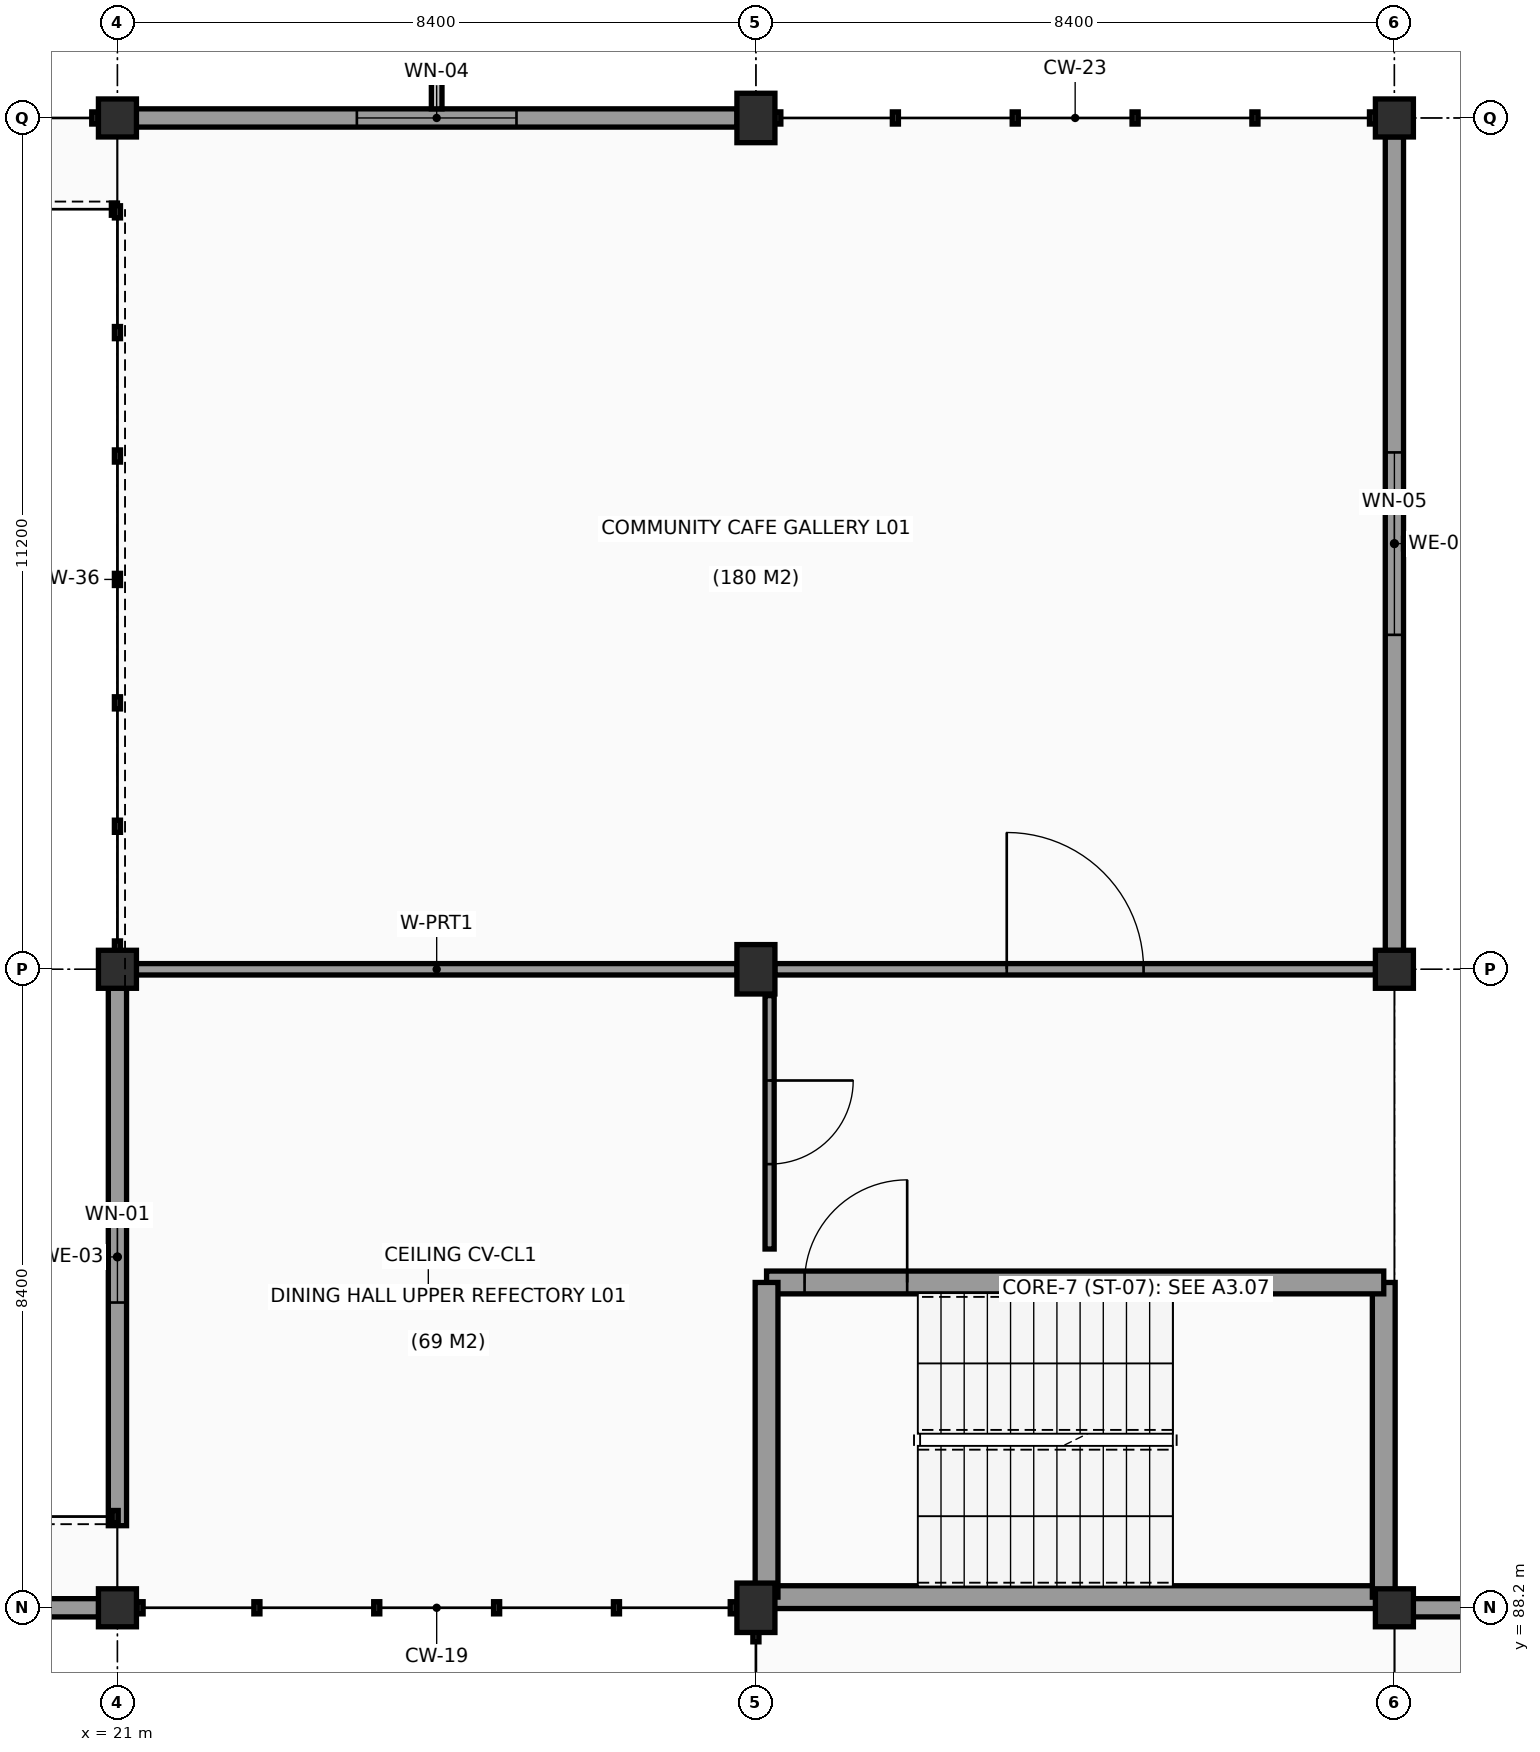
"""IFC4 building model, lengths in metres.
Left out: names, types, materials, properties, quantities, classifications, styles, units other than length and angle.
Written with IfcOpenShell. Run it as: python <this file> out.ifc"""

import sys

from ifc_helpers import new_model, si_unit, direction, frame, frame_2d, origin, origin_2d, place, context, subcontext, project, spatial, rectangle, extrude, element, fill, save


model = new_model("IFC4")
c1 = context("Model", 3, precision=1e-05, world=origin(), true_north=direction((0.0, 1.0)))
c2 = subcontext(c1, "Body", "Model", "MODEL_VIEW")
j1 = project(units=[si_unit("LENGTHUNIT", "METRE"), si_unit("PLANEANGLEUNIT", "RADIAN")], contexts=[c1])
p1 = place(None, origin())
s1 = spatial("IfcSite", under=j1, at=p1, CompositionType="ELEMENT")
p2 = place(p1, origin())
s2 = spatial("IfcBuilding", under=s1, at=p2, CompositionType="ELEMENT")
p3 = place(p2, frame((0.0, 0.0, 4.2)))
s3 = spatial("IfcBuildingStorey", under=s2, at=p3, CompositionType="ELEMENT", Elevation=4.2)
for number, where, z_axis, x_axis in (
    (1, (21.0, 88.2, 0.0), (0.0, 0.0, 1.0), (1.0, 0.0, 0.0)),
    (2, (21.0, 96.6, 0.0), (0.0, 0.0, 1.0), (1.0, 0.0, 0.0)),
    (3, (21.0, 107.8, 0.0), (0.0, 0.0, 1.0), (1.0, 0.0, 0.0)),
):
    element("IfcColumn", number, at=place(p3, frame(where, z_axis=z_axis, x_axis=x_axis)), inside=s3, PredefinedType="COLUMN", context=c2, shape_type="SweptSolid", body=[
        extrude(rectangle(XDim=0.5, YDim=0.5, at=origin_2d()), origin(), (0.0, 0.0, 1.0), 3.6),
    ])
for number, where, z_axis, x_axis in (
    (4, (29.4, 88.2, 0.0), (0.0, 0.0, 1.0), (1.0, 0.0, 0.0)),
    (5, (29.4, 96.6, 0.0), (0.0, 0.0, 1.0), (1.0, 0.0, 0.0)),
    (6, (29.4, 107.8, 0.0), (0.0, 0.0, 1.0), (1.0, 0.0, 0.0)),
):
    element("IfcColumn", number, at=place(p3, frame(where, z_axis=z_axis, x_axis=x_axis)), inside=s3, PredefinedType="COLUMN", context=c2, shape_type="SweptSolid", body=[
        extrude(rectangle(XDim=0.5, YDim=0.65, at=origin_2d()), origin(), (0.0, 0.0, 1.0), 3.6),
    ])
for number, where, z_axis, x_axis in (
    (7, (37.8, 88.2, 0.0), (0.0, 0.0, 1.0), (1.0, 0.0, 0.0)),
    (8, (37.8, 96.6, 0.0), (0.0, 0.0, 1.0), (1.0, 0.0, 0.0)),
    (9, (37.8, 107.8, 0.0), (0.0, 0.0, 1.0), (1.0, 0.0, 0.0)),
):
    element("IfcColumn", number, at=place(p3, frame(where, z_axis=z_axis, x_axis=x_axis)), inside=s3, PredefinedType="COLUMN", context=c2, shape_type="SweptSolid", body=[
        extrude(rectangle(XDim=0.5, YDim=0.5, at=origin_2d()), origin(), (0.0, 0.0, 1.0), 3.6),
    ])
p4 = place(p3, frame((20.752, 88.2, 0.0), z_axis=(0.0, 0.0, 1.0), x_axis=(-1.0, 0.0, 0.0)))
e10 = element("IfcWall", 10, at=p4, inside=s3, PredefinedType="SOLIDWALL", context=c2, shape_type="SweptSolid", body=[
    extrude(rectangle(XDim=7.904, YDim=0.24, at=frame_2d((3.952, 0.0))), origin(), (0.0, 0.0, 1.0), 2.62),
])
p5 = place(p3, frame((21.248, 107.8, 0.0), z_axis=(0.0, 0.0, 1.0), x_axis=(1.0, 0.0, 0.0)))
e11 = element("IfcWall", 11, at=p5, inside=s3, PredefinedType="SOLIDWALL", context=c2, shape_type="SweptSolid", body=[
    extrude(rectangle(XDim=7.904, YDim=0.24, at=frame_2d((3.952, 0.0))), origin(), (0.0, 0.0, 1.0), 2.67),
])
p6 = place(p5, frame((2.902, 0.0, 0.95)))
e12 = element("IfcOpeningElement", 12, at=p6, cuts=e11, PredefinedType="OPENING", context=c2, shape_type="SweptSolid", body=[
    extrude(rectangle(XDim=2.1, YDim=1.2, at=frame_2d((1.05, 0.6))), frame((0.0, 0.13, 0.0), z_axis=(0.0, -1.0, 0.0), x_axis=(1.0, 0.0, 0.0)), (0.0, 0.0, 1.0), 0.26),
])
p7 = place(p3, frame((37.8, 107.552, 0.0), z_axis=(0.0, 0.0, 1.0), x_axis=(0.0, -1.0, 0.0)))
e13 = element("IfcWall", 13, at=p7, inside=s3, PredefinedType="SOLIDWALL", context=c2, shape_type="SweptSolid", body=[
    extrude(rectangle(XDim=10.704, YDim=0.24, at=frame_2d((5.352, 0.0))), origin(), (0.0, 0.0, 1.0), 2.96),
])
p8 = place(p7, frame((4.152, 0.0, 0.95)))
e14 = element("IfcOpeningElement", 14, at=p8, cuts=e13, PredefinedType="OPENING", context=c2, shape_type="SweptSolid", body=[
    extrude(rectangle(XDim=2.4, YDim=1.2, at=frame_2d((1.2, 0.6))), frame((0.0, 0.13, 0.0), z_axis=(0.0, -1.0, 0.0), x_axis=(1.0, 0.0, 0.0)), (0.0, 0.0, 1.0), 0.26),
])
p9 = place(p3, frame((38.048, 88.2, 0.0), z_axis=(0.0, 0.0, 1.0), x_axis=(1.0, 0.0, 0.0)))
e15 = element("IfcWall", 15, at=p9, inside=s3, PredefinedType="SOLIDWALL", context=c2, shape_type="SweptSolid", body=[
    extrude(rectangle(XDim=2.504, YDim=0.24, at=frame_2d((1.252, 0.0))), origin(), (0.0, 0.0, 1.0), 2.58),
])
p10 = place(p3, frame((21.0, 89.28, 0.0), z_axis=(0.0, 0.0, 1.0), x_axis=(0.0, 1.0, 0.0)))
e16 = element("IfcWall", 16, at=p10, inside=s3, PredefinedType="SOLIDWALL", context=c2, shape_type="SweptSolid", body=[
    extrude(rectangle(XDim=7.072, YDim=0.24, at=frame_2d((3.536, 0.0))), origin(), (0.0, 0.0, 1.0), 2.72),
])
p11 = place(p10, frame((2.936, 0.0, 0.95)))
e17 = element("IfcOpeningElement", 17, at=p11, cuts=e16, PredefinedType="OPENING", context=c2, shape_type="SweptSolid", body=[
    extrude(rectangle(XDim=1.2, YDim=1.2, at=frame_2d((0.6, 0.6))), frame((0.0, 0.13, 0.0), z_axis=(0.0, -1.0, 0.0), x_axis=(1.0, 0.0, 0.0)), (0.0, 0.0, 1.0), 0.26),
])
p12 = place(p3, frame((29.54, 88.34, 0.0), z_axis=(0.0, 0.0, 1.0), x_axis=(1.0, 0.0, 0.0)))
e18 = element("IfcWall", 18, at=p12, inside=s3, PredefinedType="SHEAR", context=c2, shape_type="SweptSolid", body=[
    extrude(rectangle(XDim=8.12, YDim=0.3, at=frame_2d((4.06, 0.0))), origin(), (0.0, 0.0, 1.0), 3.6),
])
p13 = place(p3, frame((37.66, 88.34, 0.0), z_axis=(0.0, 0.0, 1.0), x_axis=(0.0, 1.0, 0.0)))
e19 = element("IfcWall", 19, at=p13, inside=s3, PredefinedType="SHEAR", context=c2, shape_type="SweptSolid", body=[
    extrude(rectangle(XDim=4.14, YDim=0.3, at=frame_2d((2.07, 0.0))), origin(), (0.0, 0.0, 1.0), 3.6),
])
p14 = place(p3, frame((37.66, 92.48, 0.0), z_axis=(0.0, 0.0, 1.0), x_axis=(-1.0, 0.0, 0.0)))
e20 = element("IfcWall", 20, at=p14, inside=s3, PredefinedType="SHEAR", context=c2, shape_type="SweptSolid", body=[
    extrude(rectangle(XDim=8.12, YDim=0.3, at=frame_2d((4.06, 0.0))), origin(), (0.0, 0.0, 1.0), 3.6),
])
p15 = place(p14, frame((6.27, 0.0, 0.0)))
e21 = element("IfcOpeningElement", 21, at=p15, cuts=e20, PredefinedType="OPENING", context=c2, shape_type="SweptSolid", body=[
    extrude(rectangle(XDim=1.35, YDim=2.15, at=frame_2d((0.675, 1.075))), frame((0.0, 0.16, 0.0), z_axis=(0.0, -1.0, 0.0), x_axis=(1.0, 0.0, 0.0)), (0.0, 0.0, 1.0), 0.32),
])
p16 = place(p3, frame((29.54, 92.48, 0.0), z_axis=(0.0, 0.0, 1.0), x_axis=(0.0, -1.0, 0.0)))
e22 = element("IfcWall", 22, at=p16, inside=s3, PredefinedType="SHEAR", context=c2, shape_type="SweptSolid", body=[
    extrude(rectangle(XDim=4.14, YDim=0.3, at=frame_2d((2.07, 0.0))), origin(), (0.0, 0.0, 1.0), 3.6),
])
p17 = place(p3, frame((21.248, 96.6, 0.0), z_axis=(0.0, 0.0, 1.0), x_axis=(1.0, 0.0, 0.0)))
e23 = element("IfcWall", 23, at=p17, inside=s3, PredefinedType="PARTITIONING", context=c2, shape_type="SweptSolid", body=[
    extrude(rectangle(XDim=7.904, YDim=0.15, at=frame_2d((3.952, 0.0))), origin(), (0.0, 0.0, 1.0), 2.57),
])
p18 = place(p3, frame((29.58, 96.254, 0.0), z_axis=(0.0, 0.0, 1.0), x_axis=(0.0, -1.0, 0.0)))
e24 = element("IfcWall", 24, at=p18, inside=s3, PredefinedType="PARTITIONING", context=c2, shape_type="SweptSolid", body=[
    extrude(rectangle(XDim=3.334, YDim=0.12, at=frame_2d((1.667, 0.0))), origin(), (0.0, 0.0, 1.0), 2.88),
])
p19 = place(p18, frame((1.117, 0.0, 0.0)))
e25 = element("IfcOpeningElement", 25, at=p19, cuts=e24, PredefinedType="OPENING", context=c2, shape_type="SweptSolid", body=[
    extrude(rectangle(XDim=1.1, YDim=2.1, at=frame_2d((0.55, 1.05))), frame((0.0, 0.07, 0.0), z_axis=(0.0, -1.0, 0.0), x_axis=(1.0, 0.0, 0.0)), (0.0, 0.0, 1.0), 0.14),
])
p20 = place(p3, frame((37.552, 96.6, 0.0), z_axis=(0.0, 0.0, 1.0), x_axis=(-1.0, 0.0, 0.0)))
e26 = element("IfcWall", 26, at=p20, inside=s3, PredefinedType="PARTITIONING", context=c2, shape_type="SweptSolid", body=[
    extrude(rectangle(XDim=7.904, YDim=0.15, at=frame_2d((3.952, 0.0))), origin(), (0.0, 0.0, 1.0), 2.57),
])
p21 = place(p20, frame((3.052, 0.0, 0.0)))
e27 = element("IfcOpeningElement", 27, at=p21, cuts=e26, PredefinedType="OPENING", context=c2, shape_type="SweptSolid", body=[
    extrude(rectangle(XDim=1.8, YDim=2.25, at=frame_2d((0.9, 1.125))), frame((0.0, 0.085, 0.0), z_axis=(0.0, -1.0, 0.0), x_axis=(1.0, 0.0, 0.0)), (0.0, 0.0, 1.0), 0.17),
])
p22 = place(p6, origin())
e28 = element("IfcWindow", 28, at=p22, inside=s3, PartitioningType="SINGLE_PANEL", PredefinedType="WINDOW", context=c2, shape_type="SweptSolid", body=[
    extrude(rectangle(XDim=2.1, YDim=1.2, at=frame_2d((1.05, 0.6))), frame((0.0, 0.03, 0.0), z_axis=(0.0, -1.0, 0.0), x_axis=(1.0, 0.0, 0.0)), (0.0, 0.0, 1.0), 0.06),
])
fill(e12, e28)
p23 = place(p8, origin())
e29 = element("IfcWindow", 29, at=p23, inside=s3, PartitioningType="SINGLE_PANEL", PredefinedType="WINDOW", context=c2, shape_type="SweptSolid", body=[
    extrude(rectangle(XDim=2.4, YDim=1.2, at=frame_2d((1.2, 0.6))), frame((0.0, 0.03, 0.0), z_axis=(0.0, -1.0, 0.0), x_axis=(1.0, 0.0, 0.0)), (0.0, 0.0, 1.0), 0.06),
])
fill(e14, e29)
p24 = place(p11, origin())
e30 = element("IfcWindow", 30, at=p24, inside=s3, PartitioningType="SINGLE_PANEL", PredefinedType="WINDOW", context=c2, shape_type="SweptSolid", body=[
    extrude(rectangle(XDim=1.2, YDim=1.2, at=frame_2d((0.6, 0.6))), frame((0.0, 0.03, 0.0), z_axis=(0.0, -1.0, 0.0), x_axis=(1.0, 0.0, 0.0)), (0.0, 0.0, 1.0), 0.06),
])
fill(e17, e30)
p25 = place(p15, frame((1.35, 0.0, 0.0), z_axis=(0.0, 0.0, 1.0), x_axis=(-1.0, 0.0, 0.0)))
e31 = element("IfcDoor", 31, at=p25, inside=s3, OperationType="SINGLE_SWING_LEFT", PredefinedType="DOOR", context=c2, shape_type="SweptSolid", body=[
    extrude(rectangle(XDim=1.35, YDim=2.15, at=frame_2d((0.675, 1.075))), frame((0.0, 0.025, 0.0), z_axis=(0.0, -1.0, 0.0), x_axis=(1.0, 0.0, 0.0)), (0.0, 0.0, 1.0), 0.05),
])
fill(e21, e31)
p26 = place(p19, origin())
e32 = element("IfcDoor", 32, at=p26, inside=s3, OperationType="SINGLE_SWING_LEFT", PredefinedType="DOOR", context=c2, shape_type="SweptSolid", body=[
    extrude(rectangle(XDim=1.1, YDim=2.1, at=frame_2d((0.55, 1.05))), frame((0.0, 0.025, 0.0), z_axis=(0.0, -1.0, 0.0), x_axis=(1.0, 0.0, 0.0)), (0.0, 0.0, 1.0), 0.05),
])
fill(e25, e32)
p27 = place(p21, origin())
e33 = element("IfcDoor", 33, at=p27, inside=s3, OperationType="DOUBLE_DOOR_SINGLE_SWING", PredefinedType="DOOR", context=c2, shape_type="SweptSolid", body=[
    extrude(rectangle(XDim=1.8, YDim=2.25, at=frame_2d((0.9, 1.125))), frame((0.0, 0.025, 0.0), z_axis=(0.0, -1.0, 0.0), x_axis=(1.0, 0.0, 0.0)), (0.0, 0.0, 1.0), 0.05),
])
fill(e27, e33)
save(model, sys.argv[1])
